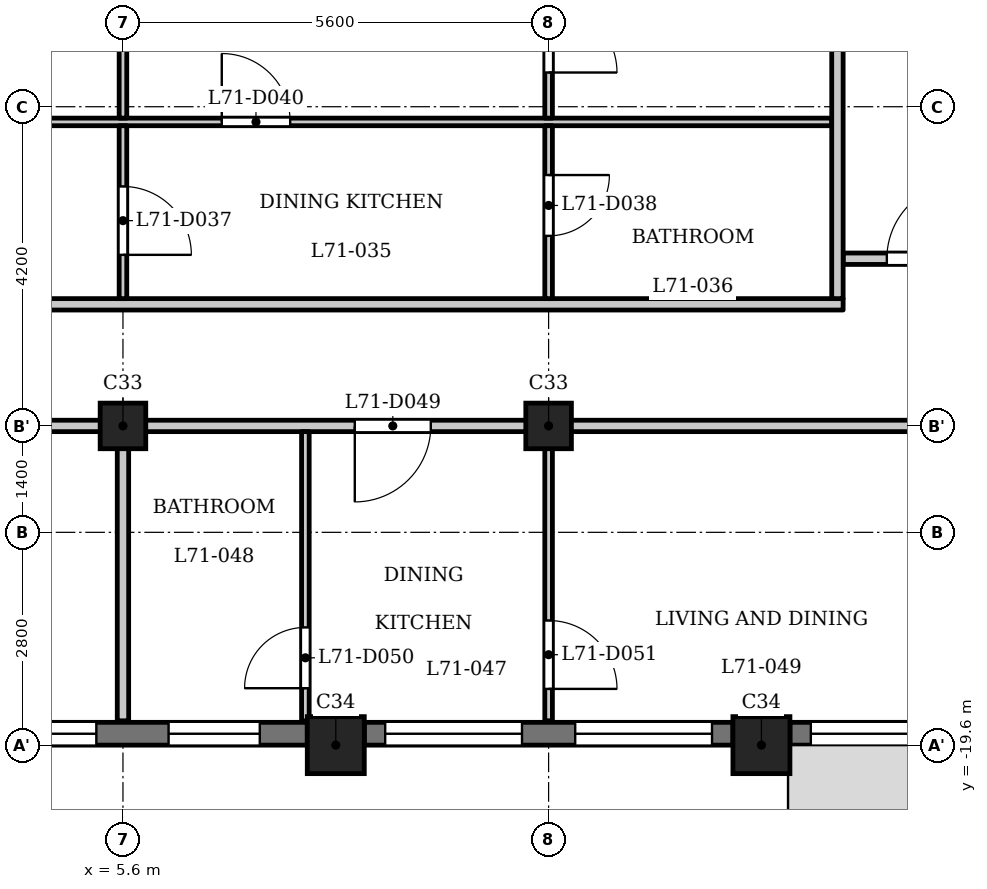
"""IFC4 building model, lengths in metres.
Left out: names, types, materials, properties, quantities, classifications, styles, units other than length and angle.
Written with IfcOpenShell. Run it as: python <this file> out.ifc"""

import sys

from ifc_helpers import new_model, si_unit, direction, frame, frame_2d, origin, origin_2d, place, context, subcontext, project, spatial, rectangle, extrude, element, fill, save


model = new_model("IFC4")
c1 = context("Model", 3, precision=1e-05, world=origin(), true_north=direction((0.0, 1.0)))
c2 = subcontext(c1, "Body", "Model", "MODEL_VIEW")
j1 = project(units=[si_unit("LENGTHUNIT", "METRE"), si_unit("PLANEANGLEUNIT", "RADIAN")], contexts=[c1])
p1 = place(None, origin())
s1 = spatial("IfcSite", under=j1, at=p1, CompositionType="ELEMENT")
p2 = place(p1, origin())
s2 = spatial("IfcBuilding", under=s1, at=p2, CompositionType="ELEMENT")
p3 = place(p2, frame((0.0, 0.0, 273.2)))
s3 = spatial("IfcBuildingStorey", under=s2, at=p3, CompositionType="ELEMENT", Elevation=273.2)
for number, where, z_axis, x_axis in (
    (1, (8.4, -19.6, 0.0), (0.0, 0.0, 1.0), (1.0, 0.0, 0.0)),
    (2, (14.0, -19.6, 0.0), (0.0, 0.0, 1.0), (1.0, 0.0, 0.0)),
):
    element("IfcColumn", number, at=place(p3, frame(where, z_axis=z_axis, x_axis=x_axis)), inside=s3, PredefinedType="COLUMN", context=c2, shape_type="SweptSolid", body=[
        extrude(rectangle(XDim=0.75, YDim=0.75, at=origin_2d()), origin(), (0.0, 0.0, 1.0), 3.5),
    ])
for number, where, z_axis, x_axis in (
    (3, (5.6, -15.4, 0.0), (0.0, 0.0, 1.0), (1.0, 0.0, 0.0)),
    (4, (11.2, -15.4, 0.0), (0.0, 0.0, 1.0), (1.0, 0.0, 0.0)),
):
    element("IfcColumn", number, at=place(p3, frame(where, z_axis=z_axis, x_axis=x_axis)), inside=s3, PredefinedType="COLUMN", context=c2, shape_type="SweptSolid", body=[
        extrude(rectangle(XDim=0.6, YDim=0.6, at=origin_2d()), origin(), (0.0, 0.0, 1.0), 3.5),
    ])
p4 = place(p3, frame((3.175, -19.45, 0.0), z_axis=(0.0, 0.0, 1.0), x_axis=(1.0, 0.0, 0.0)))
e5 = element("IfcWall", 5, at=p4, inside=s3, PredefinedType="SOLIDWALL", context=c2, shape_type="SweptSolid", body=[
    extrude(rectangle(XDim=4.85, YDim=0.3, at=frame_2d((2.425, 0.0))), origin(), (0.0, 0.0, 1.0), 2.55),
])
p5 = place(p4, frame((0.275, 0.0, 0.9)))
e6 = element("IfcOpeningElement", 6, at=p5, cuts=e5, PredefinedType="OPENING", context=c2, shape_type="SweptSolid", body=[
    extrude(rectangle(XDim=1.8, YDim=1.25, at=frame_2d((0.9, 0.625))), frame((0.0, 0.16, 0.0), z_axis=(0.0, -1.0, 0.0), x_axis=(1.0, 0.0, 0.0)), (0.0, 0.0, 1.0), 0.32),
])
p6 = place(p4, frame((3.025, 0.0, 0.6)))
e7 = element("IfcOpeningElement", 7, at=p6, cuts=e5, PredefinedType="OPENING", context=c2, shape_type="SweptSolid", body=[
    extrude(rectangle(XDim=1.2, YDim=1.55, at=frame_2d((0.6, 0.775))), frame((0.0, 0.16, 0.0), z_axis=(0.0, -1.0, 0.0), x_axis=(1.0, 0.0, 0.0)), (0.0, 0.0, 1.0), 0.32),
])
p7 = place(p3, frame((8.775, -19.45, 0.0), z_axis=(0.0, 0.0, 1.0), x_axis=(1.0, 0.0, 0.0)))
e8 = element("IfcWall", 8, at=p7, inside=s3, PredefinedType="SOLIDWALL", context=c2, shape_type="SweptSolid", body=[
    extrude(rectangle(XDim=4.85, YDim=0.3, at=frame_2d((2.425, 0.0))), origin(), (0.0, 0.0, 1.0), 2.55),
])
p8 = place(p7, frame((0.275, 0.0, 0.9)))
e9 = element("IfcOpeningElement", 9, at=p8, cuts=e8, PredefinedType="OPENING", context=c2, shape_type="SweptSolid", body=[
    extrude(rectangle(XDim=1.8, YDim=1.25, at=frame_2d((0.9, 0.625))), frame((0.0, 0.16, 0.0), z_axis=(0.0, -1.0, 0.0), x_axis=(1.0, 0.0, 0.0)), (0.0, 0.0, 1.0), 0.32),
])
p9 = place(p7, frame((2.775, 0.0, 0.9)))
e10 = element("IfcOpeningElement", 10, at=p9, cuts=e8, PredefinedType="OPENING", context=c2, shape_type="SweptSolid", body=[
    extrude(rectangle(XDim=1.8, YDim=1.25, at=frame_2d((0.9, 0.625))), frame((0.0, 0.16, 0.0), z_axis=(0.0, -1.0, 0.0), x_axis=(1.0, 0.0, 0.0)), (0.0, 0.0, 1.0), 0.32),
])
p10 = place(p3, frame((14.375, -19.45, 0.0), z_axis=(0.0, 0.0, 1.0), x_axis=(1.0, 0.0, 0.0)))
e11 = element("IfcWall", 11, at=p10, inside=s3, PredefinedType="SOLIDWALL", context=c2, shape_type="SweptSolid", body=[
    extrude(rectangle(XDim=2.825, YDim=0.3, at=frame_2d((1.413, 0.0))), origin(), (0.0, 0.0, 1.0), 2.55),
])
p11 = place(p10, frame((0.275, 0.0, 0.9)))
e12 = element("IfcOpeningElement", 12, at=p11, cuts=e11, PredefinedType="OPENING", context=c2, shape_type="SweptSolid", body=[
    extrude(rectangle(XDim=1.8, YDim=1.25, at=frame_2d((0.9, 0.625))), frame((0.0, 0.16, 0.0), z_axis=(0.0, -1.0, 0.0), x_axis=(1.0, 0.0, 0.0)), (0.0, 0.0, 1.0), 0.32),
])
p12 = place(p3, frame((-23.322, -15.4, 0.0), z_axis=(0.0, 0.0, 1.0), x_axis=(1.0, 0.0, 0.0)))
e13 = element("IfcWall", 13, at=p12, inside=s3, PredefinedType="PARTITIONING", context=c2, shape_type="SweptSolid", body=[
    extrude(rectangle(XDim=46.872, YDim=0.15, at=frame_2d((23.436, 0.0))), origin(), (0.0, 0.0, 1.0), 3.2),
])
p13 = place(p12, frame((8.172, 0.0, 0.0)))
e14 = element("IfcOpeningElement", 14, at=p13, cuts=e13, PredefinedType="OPENING", context=c2, shape_type="SweptSolid", body=[
    extrude(rectangle(XDim=1.0, YDim=2.1, at=frame_2d((0.5, 1.05))), frame((0.0, 0.085, 0.0), z_axis=(0.0, -1.0, 0.0), x_axis=(1.0, 0.0, 0.0)), (0.0, 0.0, 1.0), 0.17),
])
p14 = place(p12, frame((15.172, 0.0, 0.0)))
e15 = element("IfcOpeningElement", 15, at=p14, cuts=e13, PredefinedType="OPENING", context=c2, shape_type="SweptSolid", body=[
    extrude(rectangle(XDim=1.0, YDim=2.1, at=frame_2d((0.5, 1.05))), frame((0.0, 0.085, 0.0), z_axis=(0.0, -1.0, 0.0), x_axis=(1.0, 0.0, 0.0)), (0.0, 0.0, 1.0), 0.17),
])
p15 = place(p12, frame((31.972, 0.0, 0.0)))
e16 = element("IfcOpeningElement", 16, at=p15, cuts=e13, PredefinedType="OPENING", context=c2, shape_type="SweptSolid", body=[
    extrude(rectangle(XDim=1.0, YDim=2.1, at=frame_2d((0.5, 1.05))), frame((0.0, 0.085, 0.0), z_axis=(0.0, -1.0, 0.0), x_axis=(1.0, 0.0, 0.0)), (0.0, 0.0, 1.0), 0.17),
])
p16 = place(p3, frame((-15.075, -13.8, 0.0), z_axis=(0.0, 0.0, 1.0), x_axis=(1.0, 0.0, 0.0)))
e17 = element("IfcWall", 17, at=p16, inside=s3, PredefinedType="PARTITIONING", context=c2, shape_type="SweptSolid", body=[
    extrude(rectangle(XDim=30.15, YDim=0.15, at=frame_2d((15.075, 0.0))), origin(), (0.0, 0.0, 1.0), 3.2),
])
p17 = place(p16, frame((10.175, 0.0, 0.0)))
e18 = element("IfcOpeningElement", 18, at=p17, cuts=e17, PredefinedType="OPENING", context=c2, shape_type="SweptSolid", body=[
    extrude(rectangle(XDim=1.0, YDim=2.1, at=frame_2d((0.5, 1.05))), frame((0.0, 0.085, 0.0), z_axis=(0.0, -1.0, 0.0), x_axis=(1.0, 0.0, 0.0)), (0.0, 0.0, 1.0), 0.17),
])
p18 = place(p16, frame((15.775, 0.0, 0.0)))
e19 = element("IfcOpeningElement", 19, at=p18, cuts=e17, PredefinedType="OPENING", context=c2, shape_type="SweptSolid", body=[
    extrude(rectangle(XDim=1.0, YDim=2.1, at=frame_2d((0.5, 1.05))), frame((0.0, 0.085, 0.0), z_axis=(0.0, -1.0, 0.0), x_axis=(1.0, 0.0, 0.0)), (0.0, 0.0, 1.0), 0.17),
])
p19 = place(p3, frame((15.075, -13.2, 0.0), z_axis=(0.0, 0.0, 1.0), x_axis=(1.0, 0.0, 0.0)))
e20 = element("IfcWall", 20, at=p19, inside=s3, PredefinedType="PARTITIONING", context=c2, shape_type="SweptSolid", body=[
    extrude(rectangle(XDim=2.325, YDim=0.15, at=frame_2d((1.163, 0.0))), origin(), (0.0, 0.0, 1.0), 3.2),
])
p20 = place(p19, frame((0.575, 0.0, 0.0)))
e21 = element("IfcOpeningElement", 21, at=p20, cuts=e20, PredefinedType="OPENING", context=c2, shape_type="SweptSolid", body=[
    extrude(rectangle(XDim=1.0, YDim=2.1, at=frame_2d((0.5, 1.05))), frame((0.0, 0.085, 0.0), z_axis=(0.0, -1.0, 0.0), x_axis=(1.0, 0.0, 0.0)), (0.0, 0.0, 1.0), 0.17),
])
p21 = place(p3, frame((-14.925, -11.4, 0.0), z_axis=(0.0, 0.0, 1.0), x_axis=(1.0, 0.0, 0.0)))
e22 = element("IfcWall", 22, at=p21, inside=s3, PredefinedType="PARTITIONING", context=c2, shape_type="SweptSolid", body=[
    extrude(rectangle(XDim=29.85, YDim=0.1, at=frame_2d((14.925, 0.0))), origin(), (0.0, 0.0, 1.0), 3.2),
])
p22 = place(p21, frame((13.375, 0.0, 0.0)))
e23 = element("IfcOpeningElement", 23, at=p22, cuts=e22, PredefinedType="OPENING", context=c2, shape_type="SweptSolid", body=[
    extrude(rectangle(XDim=0.9, YDim=2.1, at=frame_2d((0.45, 1.05))), frame((0.0, 0.06, 0.0), z_axis=(0.0, -1.0, 0.0), x_axis=(1.0, 0.0, 0.0)), (0.0, 0.0, 1.0), 0.12),
])
p23 = place(p21, frame((4.775, 0.0, 0.0)))
e24 = element("IfcOpeningElement", 24, at=p23, cuts=e22, PredefinedType="OPENING", context=c2, shape_type="SweptSolid", body=[
    extrude(rectangle(XDim=0.9, YDim=2.1, at=frame_2d((0.45, 1.05))), frame((0.0, 0.06, 0.0), z_axis=(0.0, -1.0, 0.0), x_axis=(1.0, 0.0, 0.0)), (0.0, 0.0, 1.0), 0.12),
])
p24 = place(p21, frame((18.475, 0.0, 0.0)))
e25 = element("IfcOpeningElement", 25, at=p24, cuts=e22, PredefinedType="OPENING", context=c2, shape_type="SweptSolid", body=[
    extrude(rectangle(XDim=0.9, YDim=2.1, at=frame_2d((0.45, 1.05))), frame((0.0, 0.06, 0.0), z_axis=(0.0, -1.0, 0.0), x_axis=(1.0, 0.0, 0.0)), (0.0, 0.0, 1.0), 0.12),
])
p25 = place(p21, frame((21.825, 0.0, 0.0)))
e26 = element("IfcOpeningElement", 26, at=p25, cuts=e22, PredefinedType="OPENING", context=c2, shape_type="SweptSolid", body=[
    extrude(rectangle(XDim=0.9, YDim=2.1, at=frame_2d((0.45, 1.05))), frame((0.0, 0.06, 0.0), z_axis=(0.0, -1.0, 0.0), x_axis=(1.0, 0.0, 0.0)), (0.0, 0.0, 1.0), 0.12),
])
p26 = place(p3, frame((5.6, -13.725, 0.0), z_axis=(0.0, 0.0, 1.0), x_axis=(0.0, 1.0, 0.0)))
e27 = element("IfcWall", 27, at=p26, inside=s3, PredefinedType="PARTITIONING", context=c2, shape_type="SweptSolid", body=[
    extrude(rectangle(XDim=2.275, YDim=0.1, at=frame_2d((1.138, 0.0))), origin(), (0.0, 0.0, 1.0), 3.2),
])
p27 = place(p26, frame((0.576, 0.0, 0.0)))
e28 = element("IfcOpeningElement", 28, at=p27, cuts=e27, PredefinedType="OPENING", context=c2, shape_type="SweptSolid", body=[
    extrude(rectangle(XDim=0.9, YDim=2.1, at=frame_2d((0.45, 1.05))), frame((0.0, 0.06, 0.0), z_axis=(0.0, -1.0, 0.0), x_axis=(1.0, 0.0, 0.0)), (0.0, 0.0, 1.0), 0.12),
])
p28 = place(p3, frame((5.6, -11.35, 0.0), z_axis=(0.0, 0.0, 1.0), x_axis=(0.0, 1.0, 0.0)))
e29 = element("IfcWall", 29, at=p28, inside=s3, PredefinedType="PARTITIONING", context=c2, shape_type="SweptSolid", body=[
    extrude(rectangle(XDim=4.03, YDim=0.1, at=frame_2d((2.015, 0.0))), origin(), (0.0, 0.0, 1.0), 3.2),
])
p29 = place(p3, frame((5.6, -19.28, 0.0), z_axis=(0.0, 0.0, 1.0), x_axis=(0.0, 1.0, 0.0)))
e30 = element("IfcWall", 30, at=p29, inside=s3, PredefinedType="PARTITIONING", context=c2, shape_type="SweptSolid", body=[
    extrude(rectangle(XDim=3.805, YDim=0.15, at=frame_2d((1.902, 0.0))), origin(), (0.0, 0.0, 1.0), 3.2),
])
p30 = place(p3, frame((8.0, -19.28, 0.0), z_axis=(0.0, 0.0, 1.0), x_axis=(0.0, 1.0, 0.0)))
e31 = element("IfcWall", 31, at=p30, inside=s3, PredefinedType="PARTITIONING", context=c2, shape_type="SweptSolid", body=[
    extrude(rectangle(XDim=3.805, YDim=0.1, at=frame_2d((1.902, 0.0))), origin(), (0.0, 0.0, 1.0), 3.2),
])
p31 = place(p30, frame((0.429, 0.0, 0.0)))
e32 = element("IfcOpeningElement", 32, at=p31, cuts=e31, PredefinedType="OPENING", context=c2, shape_type="SweptSolid", body=[
    extrude(rectangle(XDim=0.8, YDim=2.1, at=frame_2d((0.4, 1.05))), frame((0.0, 0.06, 0.0), z_axis=(0.0, -1.0, 0.0), x_axis=(1.0, 0.0, 0.0)), (0.0, 0.0, 1.0), 0.12),
])
p32 = place(p3, frame((11.2, -19.28, 0.0), z_axis=(0.0, 0.0, 1.0), x_axis=(0.0, 1.0, 0.0)))
e33 = element("IfcWall", 33, at=p32, inside=s3, PredefinedType="PARTITIONING", context=c2, shape_type="SweptSolid", body=[
    extrude(rectangle(XDim=3.805, YDim=0.1, at=frame_2d((1.902, 0.0))), origin(), (0.0, 0.0, 1.0), 3.2),
])
p33 = place(p32, frame((0.42, 0.0, 0.0)))
e34 = element("IfcOpeningElement", 34, at=p33, cuts=e33, PredefinedType="OPENING", context=c2, shape_type="SweptSolid", body=[
    extrude(rectangle(XDim=0.9, YDim=2.1, at=frame_2d((0.45, 1.05))), frame((0.0, 0.06, 0.0), z_axis=(0.0, -1.0, 0.0), x_axis=(1.0, 0.0, 0.0)), (0.0, 0.0, 1.0), 0.12),
])
p34 = place(p3, frame((11.2, -13.725, 0.0), z_axis=(0.0, 0.0, 1.0), x_axis=(0.0, 1.0, 0.0)))
e35 = element("IfcWall", 35, at=p34, inside=s3, PredefinedType="PARTITIONING", context=c2, shape_type="SweptSolid", body=[
    extrude(rectangle(XDim=2.275, YDim=0.1, at=frame_2d((1.138, 0.0))), origin(), (0.0, 0.0, 1.0), 3.2),
])
p35 = place(p34, frame((0.826, 0.0, 0.0)))
e36 = element("IfcOpeningElement", 36, at=p35, cuts=e35, PredefinedType="OPENING", context=c2, shape_type="SweptSolid", body=[
    extrude(rectangle(XDim=0.8, YDim=2.1, at=frame_2d((0.4, 1.05))), frame((0.0, 0.06, 0.0), z_axis=(0.0, -1.0, 0.0), x_axis=(1.0, 0.0, 0.0)), (0.0, 0.0, 1.0), 0.12),
])
p36 = place(p3, frame((11.2, -11.35, 0.0), z_axis=(0.0, 0.0, 1.0), x_axis=(0.0, 1.0, 0.0)))
e37 = element("IfcWall", 37, at=p36, inside=s3, PredefinedType="PARTITIONING", context=c2, shape_type="SweptSolid", body=[
    extrude(rectangle(XDim=4.03, YDim=0.1, at=frame_2d((2.015, 0.0))), origin(), (0.0, 0.0, 1.0), 3.2),
])
p37 = place(p36, frame((0.6, 0.0, 0.0)))
e38 = element("IfcOpeningElement", 38, at=p37, cuts=e37, PredefinedType="OPENING", context=c2, shape_type="SweptSolid", body=[
    extrude(rectangle(XDim=0.9, YDim=2.1, at=frame_2d((0.45, 1.05))), frame((0.0, 0.06, 0.0), z_axis=(0.0, -1.0, 0.0), x_axis=(1.0, 0.0, 0.0)), (0.0, 0.0, 1.0), 0.12),
])
p38 = place(p3, frame((15.0, -13.725, 0.0), z_axis=(0.0, 0.0, 1.0), x_axis=(0.0, 1.0, 0.0)))
e39 = element("IfcWall", 39, at=p38, inside=s3, PredefinedType="PARTITIONING", context=c2, shape_type="SweptSolid", body=[
    extrude(rectangle(XDim=6.956, YDim=0.15, at=frame_2d((3.478, 0.0))), origin(), (0.0, 0.0, 1.0), 3.2),
])
p39 = place(p20, origin())
e40 = element("IfcDoor", 40, at=p39, inside=s3, OperationType="SINGLE_SWING_LEFT", PredefinedType="DOOR", context=c2, shape_type="SweptSolid", body=[
    extrude(rectangle(XDim=1.0, YDim=2.1, at=frame_2d((0.5, 1.05))), frame((0.0, 0.025, 0.0), z_axis=(0.0, -1.0, 0.0), x_axis=(1.0, 0.0, 0.0)), (0.0, 0.0, 1.0), 0.05),
])
fill(e21, e40)
p40 = place(p27, origin())
e41 = element("IfcDoor", 41, at=p40, inside=s3, OperationType="SINGLE_SWING_LEFT", PredefinedType="DOOR", context=c2, shape_type="SweptSolid", body=[
    extrude(rectangle(XDim=0.9, YDim=2.1, at=frame_2d((0.45, 1.05))), frame((0.0, 0.025, 0.0), z_axis=(0.0, -1.0, 0.0), x_axis=(1.0, 0.0, 0.0)), (0.0, 0.0, 1.0), 0.05),
])
fill(e28, e41)
p41 = place(p35, origin())
e42 = element("IfcDoor", 42, at=p41, inside=s3, OperationType="SINGLE_SWING_RIGHT", PredefinedType="DOOR", context=c2, shape_type="SweptSolid", body=[
    extrude(rectangle(XDim=0.8, YDim=2.1, at=frame_2d((0.4, 1.05))), frame((0.0, 0.025, 0.0), z_axis=(0.0, -1.0, 0.0), x_axis=(1.0, 0.0, 0.0)), (0.0, 0.0, 1.0), 0.05),
])
fill(e36, e42)
p42 = place(p25, origin())
e43 = element("IfcDoor", 43, at=p42, inside=s3, OperationType="SINGLE_SWING_RIGHT", PredefinedType="DOOR", context=c2, shape_type="SweptSolid", body=[
    extrude(rectangle(XDim=0.9, YDim=2.1, at=frame_2d((0.45, 1.05))), frame((0.0, 0.025, 0.0), z_axis=(0.0, -1.0, 0.0), x_axis=(1.0, 0.0, 0.0)), (0.0, 0.0, 1.0), 0.05),
])
fill(e26, e43)
p43 = place(p37, origin())
e44 = element("IfcDoor", 44, at=p43, inside=s3, OperationType="SINGLE_SWING_LEFT", PredefinedType="DOOR", context=c2, shape_type="SweptSolid", body=[
    extrude(rectangle(XDim=0.9, YDim=2.1, at=frame_2d((0.45, 1.05))), frame((0.0, 0.025, 0.0), z_axis=(0.0, -1.0, 0.0), x_axis=(1.0, 0.0, 0.0)), (0.0, 0.0, 1.0), 0.05),
])
fill(e38, e44)
p44 = place(p15, origin())
e45 = element("IfcDoor", 45, at=p44, inside=s3, OperationType="SINGLE_SWING_LEFT", PredefinedType="DOOR", context=c2, shape_type="SweptSolid", body=[
    extrude(rectangle(XDim=1.0, YDim=2.1, at=frame_2d((0.5, 1.05))), frame((0.0, 0.025, 0.0), z_axis=(0.0, -1.0, 0.0), x_axis=(1.0, 0.0, 0.0)), (0.0, 0.0, 1.0), 0.05),
])
fill(e16, e45)
p45 = place(p31, origin())
e46 = element("IfcDoor", 46, at=p45, inside=s3, OperationType="SINGLE_SWING_RIGHT", PredefinedType="DOOR", context=c2, shape_type="SweptSolid", body=[
    extrude(rectangle(XDim=0.8, YDim=2.1, at=frame_2d((0.4, 1.05))), frame((0.0, 0.025, 0.0), z_axis=(0.0, -1.0, 0.0), x_axis=(1.0, 0.0, 0.0)), (0.0, 0.0, 1.0), 0.05),
])
fill(e32, e46)
p46 = place(p33, origin())
e47 = element("IfcDoor", 47, at=p46, inside=s3, OperationType="SINGLE_SWING_LEFT", PredefinedType="DOOR", context=c2, shape_type="SweptSolid", body=[
    extrude(rectangle(XDim=0.9, YDim=2.1, at=frame_2d((0.45, 1.05))), frame((0.0, 0.025, 0.0), z_axis=(0.0, -1.0, 0.0), x_axis=(1.0, 0.0, 0.0)), (0.0, 0.0, 1.0), 0.05),
])
fill(e34, e47)
p47 = place(p5, origin())
e48 = element("IfcWindow", 48, at=p47, inside=s3, PartitioningType="SINGLE_PANEL", PredefinedType="WINDOW", context=c2, shape_type="SweptSolid", body=[
    extrude(rectangle(XDim=1.8, YDim=1.25, at=frame_2d((0.9, 0.625))), frame((0.0, 0.03, 0.0), z_axis=(0.0, -1.0, 0.0), x_axis=(1.0, 0.0, 0.0)), (0.0, 0.0, 1.0), 0.06),
])
fill(e6, e48)
p48 = place(p6, origin())
e49 = element("IfcWindow", 49, at=p48, inside=s3, PartitioningType="SINGLE_PANEL", PredefinedType="WINDOW", context=c2, shape_type="SweptSolid", body=[
    extrude(rectangle(XDim=1.2, YDim=1.55, at=frame_2d((0.6, 0.775))), frame((0.0, 0.03, 0.0), z_axis=(0.0, -1.0, 0.0), x_axis=(1.0, 0.0, 0.0)), (0.0, 0.0, 1.0), 0.06),
])
fill(e7, e49)
p49 = place(p8, origin())
e50 = element("IfcWindow", 50, at=p49, inside=s3, PartitioningType="SINGLE_PANEL", PredefinedType="WINDOW", context=c2, shape_type="SweptSolid", body=[
    extrude(rectangle(XDim=1.8, YDim=1.25, at=frame_2d((0.9, 0.625))), frame((0.0, 0.03, 0.0), z_axis=(0.0, -1.0, 0.0), x_axis=(1.0, 0.0, 0.0)), (0.0, 0.0, 1.0), 0.06),
])
fill(e9, e50)
p50 = place(p9, origin())
e51 = element("IfcWindow", 51, at=p50, inside=s3, PartitioningType="SINGLE_PANEL", PredefinedType="WINDOW", context=c2, shape_type="SweptSolid", body=[
    extrude(rectangle(XDim=1.8, YDim=1.25, at=frame_2d((0.9, 0.625))), frame((0.0, 0.03, 0.0), z_axis=(0.0, -1.0, 0.0), x_axis=(1.0, 0.0, 0.0)), (0.0, 0.0, 1.0), 0.06),
])
fill(e10, e51)
p51 = place(p11, origin())
e52 = element("IfcWindow", 52, at=p51, inside=s3, PartitioningType="SINGLE_PANEL", PredefinedType="WINDOW", context=c2, shape_type="SweptSolid", body=[
    extrude(rectangle(XDim=1.8, YDim=1.25, at=frame_2d((0.9, 0.625))), frame((0.0, 0.03, 0.0), z_axis=(0.0, -1.0, 0.0), x_axis=(1.0, 0.0, 0.0)), (0.0, 0.0, 1.0), 0.06),
])
fill(e12, e52)
save(model, sys.argv[1])
